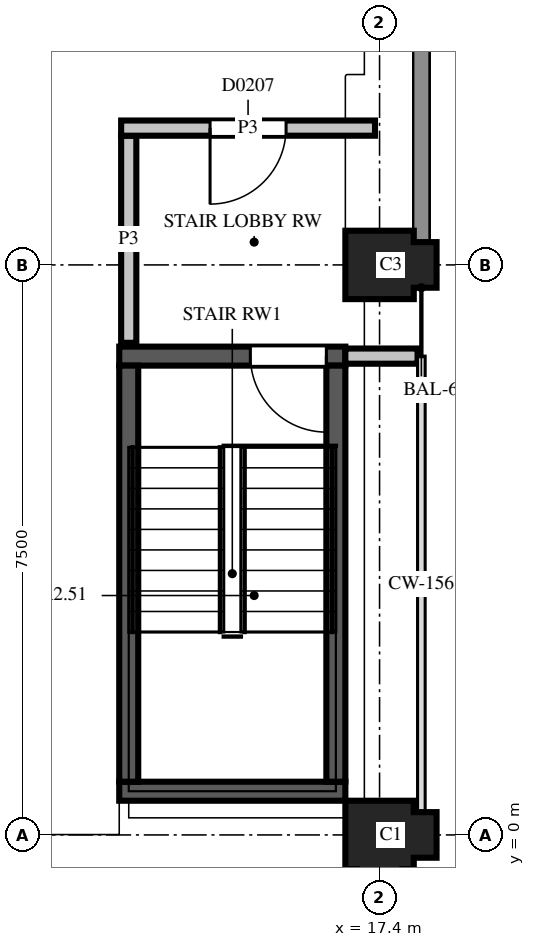
"""IFC4 building model, lengths in metres.
Left out: names, types, materials, properties, quantities, classifications, styles, units other than length and angle.
Written with IfcOpenShell. Run it as: python <this file> out.ifc"""

import sys

from ifc_helpers import new_model, si_unit, direction, frame, frame_2d, origin, place, context, subcontext, project, spatial, polyline, rectangle, outline, extrude, element, fill, save


model = new_model("IFC4")
c1 = context("Model", 3, precision=1e-05, world=origin(), true_north=direction((0.0, 1.0)))
c2 = subcontext(c1, "Body", "Model", "MODEL_VIEW")
j1 = project(units=[si_unit("LENGTHUNIT", "METRE"), si_unit("PLANEANGLEUNIT", "RADIAN")], contexts=[c1])
p1 = place(None, origin())
s1 = spatial("IfcSite", under=j1, at=p1, CompositionType="ELEMENT")
p2 = place(p1, origin())
s2 = spatial("IfcBuilding", under=s1, at=p2, CompositionType="ELEMENT")
p3 = place(p2, frame((0.0, 0.0, 8.2)))
s3 = spatial("IfcBuildingStorey", under=s2, at=p3, CompositionType="ELEMENT", Elevation=8.2)
p4 = place(p3, frame((17.4, 0.0, 0.0), z_axis=(0.0, 0.0, 1.0), x_axis=(0.0, -1.0, 0.0)))
e1 = element("IfcColumn", 1, at=p4, inside=s3, PredefinedType="COLUMN", context=c2, shape_type="SweptSolid", body=[
    extrude(outline(polyline([(-0.45, -0.45), (0.45, -0.45), (0.45, -0.3), (0.75, -0.3), (0.75, 0.3), (0.45, 0.3), (0.45, 0.45), (0.3, 0.45), (0.3, 0.75), (-0.3, 0.75), (-0.3, 0.45), (-0.45, 0.45), (-0.45, -0.45)])), origin(), (0.0, 0.0, 1.0), 3.7),
])
p5 = place(p3, frame((17.4, 7.5, 0.0), z_axis=(0.0, 0.0, 1.0), x_axis=(1.0, 0.0, 0.0)))
e2 = element("IfcColumn", 2, at=p5, inside=s3, PredefinedType="COLUMN", context=c2, shape_type="SweptSolid", body=[
    extrude(outline(polyline([(-0.45, -0.45), (0.45, -0.45), (0.45, -0.3), (0.75, -0.3), (0.75, 0.3), (0.45, 0.3), (0.45, 0.45), (-0.45, 0.45), (-0.45, -0.45)])), origin(), (0.0, 0.0, 1.0), 3.7),
])
p6 = place(p3, frame((13.975, 0.575, 0.0), z_axis=(0.0, 0.0, 1.0), x_axis=(1.0, 0.0, 0.0)))
e3 = element("IfcWall", 3, at=p6, inside=s3, PredefinedType="SHEAR", context=c2, shape_type="SweptSolid", body=[
    extrude(rectangle(XDim=2.975, YDim=0.25, at=frame_2d((1.487, 0.0))), origin(), (0.0, 0.0, 1.0), 3.7),
])
p7 = place(p3, frame((13.975, 6.3, 0.0), z_axis=(0.0, 0.0, 1.0), x_axis=(1.0, 0.0, 0.0)))
e4 = element("IfcWall", 4, at=p7, inside=s3, PredefinedType="SHEAR", context=c2, shape_type="SweptSolid", body=[
    extrude(rectangle(XDim=2.975, YDim=0.25, at=frame_2d((1.487, 0.0))), origin(), (0.0, 0.0, 1.0), 3.7),
])
p8 = place(p7, frame((1.725, 0.0, 0.0)))
e5 = element("IfcOpeningElement", 5, at=p8, cuts=e4, PredefinedType="OPENING", context=c2, shape_type="SweptSolid", body=[
    extrude(rectangle(XDim=1.0, YDim=2.1, at=frame_2d((0.5, 1.05))), frame((0.0, 0.135, 0.0), z_axis=(0.0, -1.0, 0.0), x_axis=(1.0, 0.0, 0.0)), (0.0, 0.0, 1.0), 0.27),
])
for number, where, z_axis, x_axis in (
    (6, (14.1, 0.7, 0.0), (0.0, 0.0, 1.0), (0.0, 1.0, 0.0)),
    (7, (16.825, 0.7, 0.0), (0.0, 0.0, 1.0), (0.0, 1.0, 0.0)),
):
    element("IfcWall", number, at=place(p3, frame(where, z_axis=z_axis, x_axis=x_axis)), inside=s3, PredefinedType="SHEAR", context=c2, shape_type="SweptSolid", body=[
        extrude(rectangle(XDim=5.475, YDim=0.25, at=frame_2d((2.738, 0.0))), origin(), (0.0, 0.0, 1.0), 3.7),
    ])
p9 = place(p3, frame((16.95, 6.3, 0.0), z_axis=(0.0, 0.0, 1.0), x_axis=(1.0, 0.0, 0.0)))
e8 = element("IfcWall", 8, at=p9, inside=s3, PredefinedType="PARTITIONING", context=c2, shape_type="SweptSolid", body=[
    extrude(rectangle(XDim=0.95, YDim=0.2, at=frame_2d((0.475, 0.0))), origin(), (0.0, 0.0, 1.0), 2.88),
])
p10 = place(p3, frame((14.1, 9.2, 0.0), z_axis=(0.0, 0.0, 1.0), x_axis=(0.0, -1.0, 0.0)))
e9 = element("IfcWall", 9, at=p10, inside=s3, PredefinedType="PARTITIONING", context=c2, shape_type="SweptSolid", body=[
    extrude(rectangle(XDim=2.725, YDim=0.2, at=frame_2d((1.362, 0.0))), origin(), (0.0, 0.0, 1.0), 2.88),
])
p11 = place(p3, frame((17.34, 9.3, 0.0), z_axis=(0.0, 0.0, 1.0), x_axis=(-1.0, 0.0, 0.0)))
e10 = element("IfcWall", 10, at=p11, inside=s3, PredefinedType="PARTITIONING", context=c2, shape_type="SweptSolid", body=[
    extrude(rectangle(XDim=3.34, YDim=0.2, at=frame_2d((1.67, 0.0))), origin(), (0.0, 0.0, 1.0), 2.88),
])
p12 = place(p11, frame((1.17, 0.0, 0.0)))
e11 = element("IfcOpeningElement", 11, at=p12, cuts=e10, PredefinedType="OPENING", context=c2, shape_type="SweptSolid", body=[
    extrude(rectangle(XDim=1.0, YDim=2.1, at=frame_2d((0.5, 1.05))), frame((0.0, 0.11, 0.0), z_axis=(0.0, -1.0, 0.0), x_axis=(1.0, 0.0, 0.0)), (0.0, 0.0, 1.0), 0.22),
])
p13 = place(p12, origin())
e12 = element("IfcDoor", 12, at=p13, inside=s3, OperationType="SINGLE_SWING_LEFT", PredefinedType="DOOR", context=c2, shape_type="SweptSolid", body=[
    extrude(rectangle(XDim=1.0, YDim=2.1, at=frame_2d((0.5, 1.05))), frame((0.0, 0.025, 0.0), z_axis=(0.0, -1.0, 0.0), x_axis=(1.0, 0.0, 0.0)), (0.0, 0.0, 1.0), 0.05),
])
fill(e11, e12)
p14 = place(p8, origin())
e13 = element("IfcDoor", 13, at=p14, inside=s3, OperationType="SINGLE_SWING_RIGHT", PredefinedType="DOOR", context=c2, shape_type="SweptSolid", body=[
    extrude(rectangle(XDim=1.0, YDim=2.1, at=frame_2d((0.5, 1.05))), frame((0.0, 0.025, 0.0), z_axis=(0.0, -1.0, 0.0), x_axis=(1.0, 0.0, 0.0)), (0.0, 0.0, 1.0), 0.05),
])
fill(e5, e13)
save(model, sys.argv[1])
